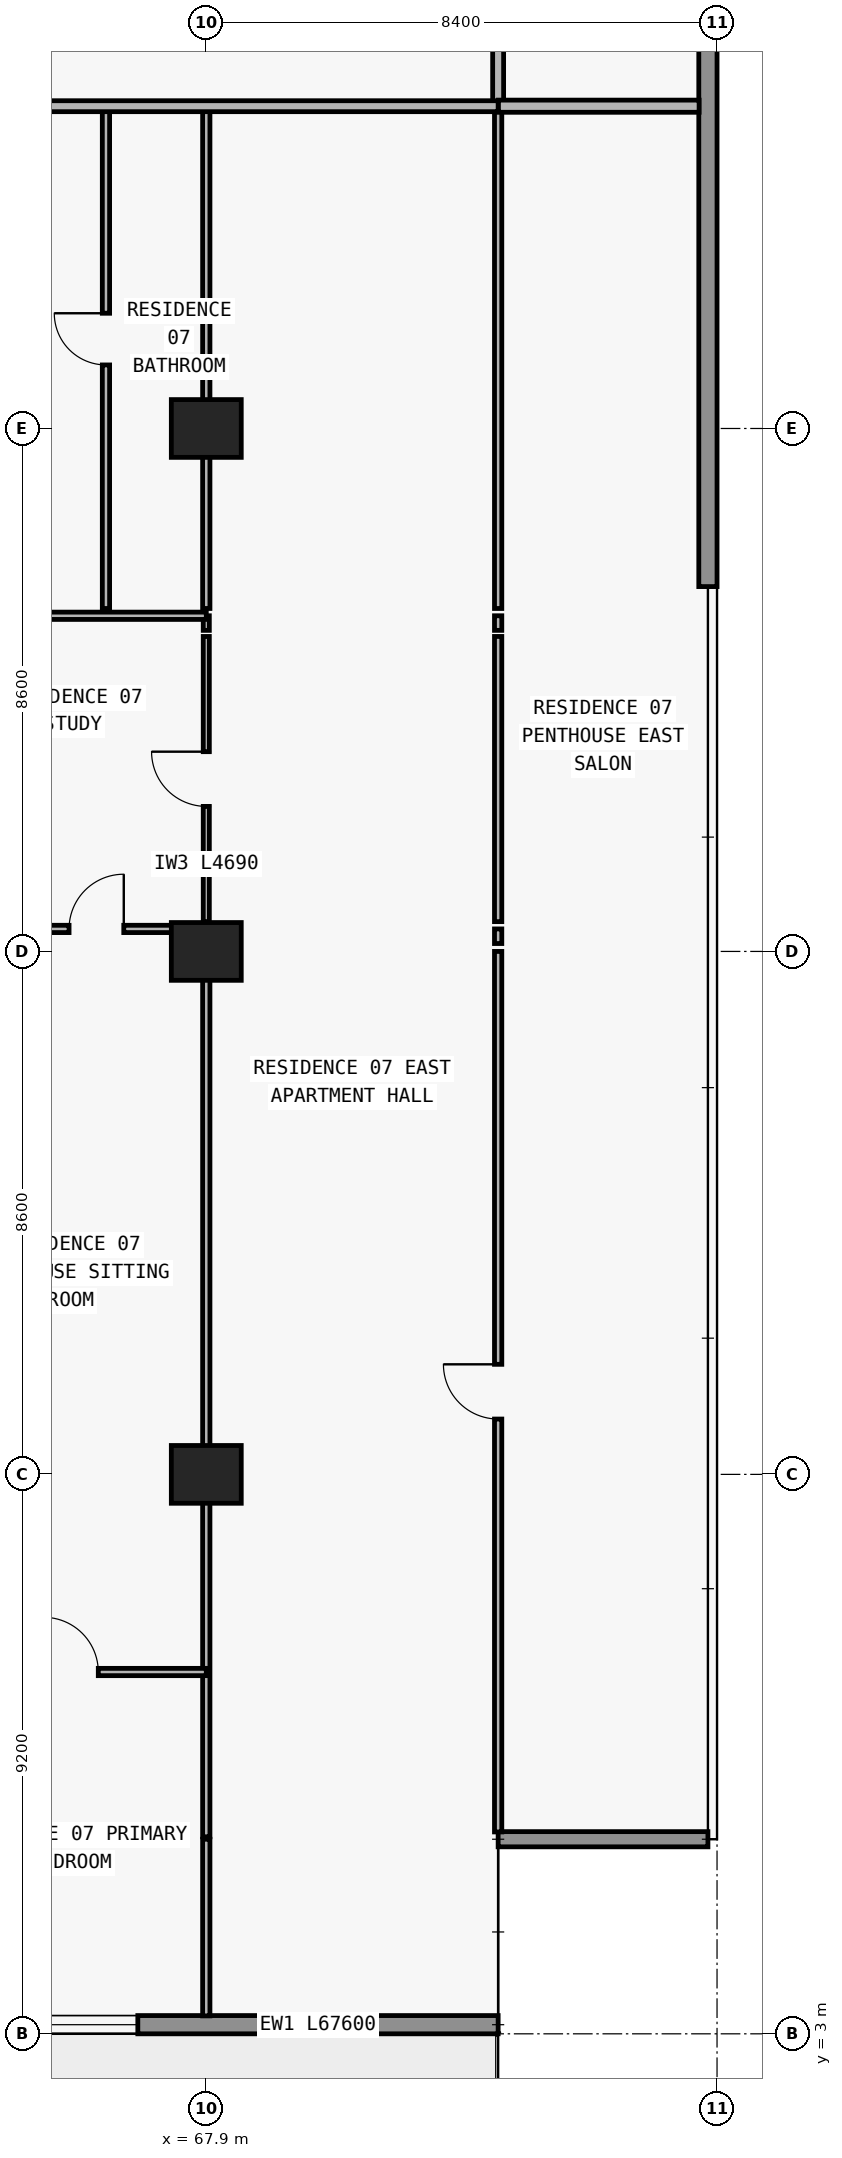
"""IFC4 building model, lengths in metres.
Left out: names, types, materials, properties, quantities, classifications, styles, units other than length and angle.
Written with IfcOpenShell. Run it as: python <this file> out.ifc"""

import sys

from ifc_helpers import new_model, si_unit, direction, frame, frame_2d, origin, origin_2d, place, context, subcontext, project, spatial, rectangle, extrude, element, fill, save


model = new_model("IFC4")
c1 = context("Model", 3, precision=1e-05, world=origin(), true_north=direction((0.0, 1.0)))
c2 = subcontext(c1, "Body", "Model", "MODEL_VIEW")
j1 = project(units=[si_unit("LENGTHUNIT", "METRE"), si_unit("PLANEANGLEUNIT", "RADIAN")], contexts=[c1])
p1 = place(None, origin())
s1 = spatial("IfcSite", under=j1, at=p1, CompositionType="ELEMENT")
p2 = place(p1, origin())
s2 = spatial("IfcBuilding", under=s1, at=p2, CompositionType="ELEMENT")
p3 = place(p2, frame((0.0, 0.0, 69.6)))
s3 = spatial("IfcBuildingStorey", under=s2, at=p3, CompositionType="ELEMENT", Elevation=69.6)
for number, where, z_axis, x_axis in (
    (1, (67.9, 12.2, 0.0), (0.0, 0.0, 1.0), (1.0, 0.0, 0.0)),
    (2, (67.9, 20.8, 0.0), (0.0, 0.0, 1.0), (1.0, 0.0, 0.0)),
    (3, (67.9, 29.4, 0.0), (0.0, 0.0, 1.0), (1.0, 0.0, 0.0)),
):
    element("IfcColumn", number, at=place(p3, frame(where, z_axis=z_axis, x_axis=x_axis)), inside=s3, PredefinedType="COLUMN", context=c2, shape_type="SweptSolid", body=[
        extrude(rectangle(XDim=1.15, YDim=0.95, at=origin_2d()), origin(), (0.0, 0.0, 1.0), 3.05),
    ])
p4 = place(p3, frame((72.7, 3.15, 0.0), z_axis=(0.0, 0.0, 1.0), x_axis=(-1.0, 0.0, 0.0)))
e4 = element("IfcWall", 4, at=p4, inside=s3, PredefinedType="STANDARD", context=c2, shape_type="SweptSolid", body=[
    extrude(rectangle(XDim=67.6, YDim=0.3, at=frame_2d((33.8, 0.0))), origin(), (0.0, 0.0, 1.0), 3.05),
])
p5 = place(p4, frame((59.826, 0.0, 0.0)))
e5 = element("IfcOpeningElement", 5, at=p5, cuts=e4, PredefinedType="OPENING", context=c2, shape_type="SweptSolid", body=[
    extrude(rectangle(XDim=2.0, YDim=2.3, at=frame_2d((1.0, 1.15))), frame((0.0, 0.16, 0.0), z_axis=(0.0, -1.0, 0.0), x_axis=(1.0, 0.0, 0.0)), (0.0, 0.0, 1.0), 0.32),
])
p6 = place(p4, frame((55.526, 0.0, 0.85)))
e6 = element("IfcOpeningElement", 6, at=p6, cuts=e4, PredefinedType="OPENING", context=c2, shape_type="SweptSolid", body=[
    extrude(rectangle(XDim=2.2, YDim=1.55, at=frame_2d((1.1, 0.775))), frame((0.0, 0.16, 0.0), z_axis=(0.0, -1.0, 0.0), x_axis=(1.0, 0.0, 0.0)), (0.0, 0.0, 1.0), 0.32),
])
p7 = place(p4, frame((51.09, 0.0, 0.0)))
e7 = element("IfcOpeningElement", 7, at=p7, cuts=e4, PredefinedType="OPENING", context=c2, shape_type="SweptSolid", body=[
    extrude(rectangle(XDim=2.0, YDim=2.3, at=frame_2d((1.0, 1.15))), frame((0.0, 0.16, 0.0), z_axis=(0.0, -1.0, 0.0), x_axis=(1.0, 0.0, 0.0)), (0.0, 0.0, 1.0), 0.32),
])
p8 = place(p4, frame((46.99, 0.0, 0.85)))
e8 = element("IfcOpeningElement", 8, at=p8, cuts=e4, PredefinedType="OPENING", context=c2, shape_type="SweptSolid", body=[
    extrude(rectangle(XDim=1.8, YDim=1.55, at=frame_2d((0.9, 0.775))), frame((0.0, 0.16, 0.0), z_axis=(0.0, -1.0, 0.0), x_axis=(1.0, 0.0, 0.0)), (0.0, 0.0, 1.0), 0.32),
])
p9 = place(p4, frame((43.026, 0.0, 0.0)))
e9 = element("IfcOpeningElement", 9, at=p9, cuts=e4, PredefinedType="OPENING", context=c2, shape_type="SweptSolid", body=[
    extrude(rectangle(XDim=2.0, YDim=2.3, at=frame_2d((1.0, 1.15))), frame((0.0, 0.16, 0.0), z_axis=(0.0, -1.0, 0.0), x_axis=(1.0, 0.0, 0.0)), (0.0, 0.0, 1.0), 0.32),
])
p10 = place(p4, frame((38.726, 0.0, 0.85)))
e10 = element("IfcOpeningElement", 10, at=p10, cuts=e4, PredefinedType="OPENING", context=c2, shape_type="SweptSolid", body=[
    extrude(rectangle(XDim=2.2, YDim=1.55, at=frame_2d((1.1, 0.775))), frame((0.0, 0.16, 0.0), z_axis=(0.0, -1.0, 0.0), x_axis=(1.0, 0.0, 0.0)), (0.0, 0.0, 1.0), 0.32),
])
p11 = place(p4, frame((34.51, 0.0, 0.0)))
e11 = element("IfcOpeningElement", 11, at=p11, cuts=e4, PredefinedType="OPENING", context=c2, shape_type="SweptSolid", body=[
    extrude(rectangle(XDim=2.0, YDim=2.3, at=frame_2d((1.0, 1.15))), frame((0.0, 0.16, 0.0), z_axis=(0.0, -1.0, 0.0), x_axis=(1.0, 0.0, 0.0)), (0.0, 0.0, 1.0), 0.32),
])
p12 = place(p4, frame((30.81, 0.0, 0.85)))
e12 = element("IfcOpeningElement", 12, at=p12, cuts=e4, PredefinedType="OPENING", context=c2, shape_type="SweptSolid", body=[
    extrude(rectangle(XDim=1.8, YDim=1.55, at=frame_2d((0.9, 0.775))), frame((0.0, 0.16, 0.0), z_axis=(0.0, -1.0, 0.0), x_axis=(1.0, 0.0, 0.0)), (0.0, 0.0, 1.0), 0.32),
])
p13 = place(p4, frame((27.026, 0.0, 0.0)))
e13 = element("IfcOpeningElement", 13, at=p13, cuts=e4, PredefinedType="OPENING", context=c2, shape_type="SweptSolid", body=[
    extrude(rectangle(XDim=2.0, YDim=2.3, at=frame_2d((1.0, 1.15))), frame((0.0, 0.16, 0.0), z_axis=(0.0, -1.0, 0.0), x_axis=(1.0, 0.0, 0.0)), (0.0, 0.0, 1.0), 0.32),
])
p14 = place(p4, frame((22.726, 0.0, 0.85)))
e14 = element("IfcOpeningElement", 14, at=p14, cuts=e4, PredefinedType="OPENING", context=c2, shape_type="SweptSolid", body=[
    extrude(rectangle(XDim=2.2, YDim=1.55, at=frame_2d((1.1, 0.775))), frame((0.0, 0.16, 0.0), z_axis=(0.0, -1.0, 0.0), x_axis=(1.0, 0.0, 0.0)), (0.0, 0.0, 1.0), 0.32),
])
p15 = place(p4, frame((18.29, 0.0, 0.0)))
e15 = element("IfcOpeningElement", 15, at=p15, cuts=e4, PredefinedType="OPENING", context=c2, shape_type="SweptSolid", body=[
    extrude(rectangle(XDim=2.0, YDim=2.3, at=frame_2d((1.0, 1.15))), frame((0.0, 0.16, 0.0), z_axis=(0.0, -1.0, 0.0), x_axis=(1.0, 0.0, 0.0)), (0.0, 0.0, 1.0), 0.32),
])
p16 = place(p4, frame((14.19, 0.0, 0.85)))
e16 = element("IfcOpeningElement", 16, at=p16, cuts=e4, PredefinedType="OPENING", context=c2, shape_type="SweptSolid", body=[
    extrude(rectangle(XDim=1.8, YDim=1.55, at=frame_2d((0.9, 0.775))), frame((0.0, 0.16, 0.0), z_axis=(0.0, -1.0, 0.0), x_axis=(1.0, 0.0, 0.0)), (0.0, 0.0, 1.0), 0.32),
])
p17 = place(p4, frame((10.226, 0.0, 0.0)))
e17 = element("IfcOpeningElement", 17, at=p17, cuts=e4, PredefinedType="OPENING", context=c2, shape_type="SweptSolid", body=[
    extrude(rectangle(XDim=2.0, YDim=2.3, at=frame_2d((1.0, 1.15))), frame((0.0, 0.16, 0.0), z_axis=(0.0, -1.0, 0.0), x_axis=(1.0, 0.0, 0.0)), (0.0, 0.0, 1.0), 0.32),
])
p18 = place(p4, frame((5.926, 0.0, 0.85)))
e18 = element("IfcOpeningElement", 18, at=p18, cuts=e4, PredefinedType="OPENING", context=c2, shape_type="SweptSolid", body=[
    extrude(rectangle(XDim=2.2, YDim=1.55, at=frame_2d((1.1, 0.775))), frame((0.0, 0.16, 0.0), z_axis=(0.0, -1.0, 0.0), x_axis=(1.0, 0.0, 0.0)), (0.0, 0.0, 1.0), 0.32),
])
p19 = place(p3, frame((72.7, 6.2, 0.0), z_axis=(0.0, 0.0, 1.0), x_axis=(1.0, 0.0, 0.0)))
e19 = element("IfcWall", 19, at=p19, inside=s3, PredefinedType="ELEMENTEDWALL", context=c2, shape_type="SweptSolid", body=[
    extrude(rectangle(XDim=3.45, YDim=0.25, at=frame_2d((1.725, 0.0))), origin(), (0.0, 0.0, 1.0), 3.05),
])
p20 = place(p3, frame((76.15, 47.4, 0.0), z_axis=(0.0, 0.0, 1.0), x_axis=(0.0, -1.0, 0.0)))
e20 = element("IfcWall", 20, at=p20, inside=s3, PredefinedType="STANDARD", context=c2, shape_type="SweptSolid", body=[
    extrude(rectangle(XDim=20.6, YDim=0.3, at=frame_2d((10.3, 0.0))), origin(), (0.0, 0.0, 1.0), 3.05),
])
p21 = place(p3, frame((66.25, 26.44, 0.0), z_axis=(0.0, 0.0, 1.0), x_axis=(0.0, 1.0, 0.0)))
e21 = element("IfcWall", 21, at=p21, inside=s3, PredefinedType="PARTITIONING", context=c2, shape_type="SweptSolid", body=[
    extrude(rectangle(XDim=8.26, YDim=0.12, at=frame_2d((4.13, 0.0))), origin(), (0.0, 0.0, 1.0), 3.05),
])
p22 = place(p21, frame((4.005, 0.0, 0.0)))
e22 = element("IfcOpeningElement", 22, at=p22, cuts=e21, PredefinedType="OPENING", context=c2, shape_type="SweptSolid", body=[
    extrude(rectangle(XDim=0.85, YDim=2.1, at=frame_2d((0.425, 1.05))), frame((0.0, 0.07, 0.0), z_axis=(0.0, -1.0, 0.0), x_axis=(1.0, 0.0, 0.0)), (0.0, 0.0, 1.0), 0.14),
])
p23 = place(p3, frame((67.9, 3.295, 0.0), z_axis=(0.0, 0.0, 1.0), x_axis=(0.0, 1.0, 0.0)))
e23 = element("IfcWall", 23, at=p23, inside=s3, PredefinedType="PARTITIONING", context=c2, shape_type="SweptSolid", body=[
    extrude(rectangle(XDim=2.905, YDim=0.12, at=frame_2d((1.453, 0.0))), origin(), (0.0, 0.0, 1.0), 3.05),
])
p24 = place(p3, frame((67.9, 6.24, 0.0), z_axis=(0.0, 0.0, 1.0), x_axis=(0.0, 1.0, 0.0)))
e24 = element("IfcWall", 24, at=p24, inside=s3, PredefinedType="PARTITIONING", context=c2, shape_type="SweptSolid", body=[
    extrude(rectangle(XDim=14.56, YDim=0.12, at=frame_2d((7.28, 0.0))), origin(), (0.0, 0.0, 1.0), 2.11),
])
p25 = place(p3, frame((67.9, 20.93, 0.0), z_axis=(0.0, 0.0, 1.0), x_axis=(0.0, 1.0, 0.0)))
e25 = element("IfcWall", 25, at=p25, inside=s3, PredefinedType="PARTITIONING", context=c2, shape_type="SweptSolid", body=[
    extrude(rectangle(XDim=0.24, YDim=0.12, at=frame_2d((0.12, 0.0))), origin(), (0.0, 0.0, 1.0), 3.05),
])
p26 = place(p3, frame((67.9, 21.29, 0.0), z_axis=(0.0, 0.0, 1.0), x_axis=(0.0, 1.0, 0.0)))
e26 = element("IfcWall", 26, at=p26, inside=s3, PredefinedType="MOVABLE", context=c2, shape_type="SweptSolid", body=[
    extrude(rectangle(XDim=4.69, YDim=0.1, at=frame_2d((2.345, 0.0))), origin(), (0.0, 0.0, 1.0), 2.11),
])
p27 = place(p26, frame((1.895, 0.0, 0.0)))
e27 = element("IfcOpeningElement", 27, at=p27, cuts=e26, PredefinedType="OPENING", context=c2, shape_type="SweptSolid", body=[
    extrude(rectangle(XDim=0.9, YDim=2.06, at=frame_2d((0.45, 1.03))), frame((0.0, 0.06, 0.0), z_axis=(0.0, -1.0, 0.0), x_axis=(1.0, 0.0, 0.0)), (0.0, 0.0, 1.0), 0.12),
])
p28 = place(p3, frame((67.9, 26.08, 0.0), z_axis=(0.0, 0.0, 1.0), x_axis=(0.0, 1.0, 0.0)))
e28 = element("IfcWall", 28, at=p28, inside=s3, PredefinedType="MOVABLE", context=c2, shape_type="SweptSolid", body=[
    extrude(rectangle(XDim=0.24, YDim=0.1, at=frame_2d((0.12, 0.0))), origin(), (0.0, 0.0, 1.0), 2.11),
])
p29 = place(p3, frame((67.9, 26.44, 0.0), z_axis=(0.0, 0.0, 1.0), x_axis=(0.0, 1.0, 0.0)))
e29 = element("IfcWall", 29, at=p29, inside=s3, PredefinedType="PARTITIONING", context=c2, shape_type="SweptSolid", body=[
    extrude(rectangle(XDim=8.26, YDim=0.12, at=frame_2d((4.13, 0.0))), origin(), (0.0, 0.0, 1.0), 2.11),
])
p30 = place(p3, frame((72.7, 6.32, 0.0), z_axis=(0.0, 0.0, 1.0), x_axis=(0.0, 1.0, 0.0)))
e30 = element("IfcWall", 30, at=p30, inside=s3, PredefinedType="PARTITIONING", context=c2, shape_type="SweptSolid", body=[
    extrude(rectangle(XDim=14.48, YDim=0.12, at=frame_2d((7.24, 0.0))), origin(), (0.0, 0.0, 1.0), 3.05),
])
p31 = place(p30, frame((6.79, 0.0, 0.0)))
e31 = element("IfcOpeningElement", 31, at=p31, cuts=e30, PredefinedType="OPENING", context=c2, shape_type="SweptSolid", body=[
    extrude(rectangle(XDim=0.9, YDim=2.15, at=frame_2d((0.45, 1.075))), frame((0.0, 0.07, 0.0), z_axis=(0.0, -1.0, 0.0), x_axis=(1.0, 0.0, 0.0)), (0.0, 0.0, 1.0), 0.14),
])
p32 = place(p3, frame((72.7, 20.93, 0.0), z_axis=(0.0, 0.0, 1.0), x_axis=(0.0, 1.0, 0.0)))
e32 = element("IfcWall", 32, at=p32, inside=s3, PredefinedType="PARTITIONING", context=c2, shape_type="SweptSolid", body=[
    extrude(rectangle(XDim=0.24, YDim=0.12, at=frame_2d((0.12, 0.0))), origin(), (0.0, 0.0, 1.0), 3.05),
])
p33 = place(p3, frame((72.7, 21.29, 0.0), z_axis=(0.0, 0.0, 1.0), x_axis=(0.0, 1.0, 0.0)))
e33 = element("IfcWall", 33, at=p33, inside=s3, PredefinedType="PARTITIONING", context=c2, shape_type="SweptSolid", body=[
    extrude(rectangle(XDim=4.69, YDim=0.12, at=frame_2d((2.345, 0.0))), origin(), (0.0, 0.0, 1.0), 3.05),
])
p34 = place(p3, frame((72.7, 26.08, 0.0), z_axis=(0.0, 0.0, 1.0), x_axis=(0.0, 1.0, 0.0)))
e34 = element("IfcWall", 34, at=p34, inside=s3, PredefinedType="PARTITIONING", context=c2, shape_type="SweptSolid", body=[
    extrude(rectangle(XDim=0.24, YDim=0.12, at=frame_2d((0.12, 0.0))), origin(), (0.0, 0.0, 1.0), 3.05),
])
p35 = place(p3, frame((72.7, 26.44, 0.0), z_axis=(0.0, 0.0, 1.0), x_axis=(0.0, 1.0, 0.0)))
e35 = element("IfcWall", 35, at=p35, inside=s3, PredefinedType="PARTITIONING", context=c2, shape_type="SweptSolid", body=[
    extrude(rectangle(XDim=8.26, YDim=0.12, at=frame_2d((4.13, 0.0))), origin(), (0.0, 0.0, 1.0), 3.05),
])
p36 = place(p3, frame((72.7, 34.705, 0.0), z_axis=(0.0, 0.0, 1.0), x_axis=(0.0, 1.0, 0.0)))
e36 = element("IfcWall", 36, at=p36, inside=s3, PredefinedType="PARTITIONING", context=c2, shape_type="SweptSolid", body=[
    extrude(rectangle(XDim=2.195, YDim=0.18, at=frame_2d((1.097, 0.0))), origin(), (0.0, 0.0, 1.0), 3.05),
])
p37 = place(p3, frame((63.448, 8.95, 0.0), z_axis=(0.0, 0.0, 1.0), x_axis=(1.0, 0.0, 0.0)))
e37 = element("IfcWall", 37, at=p37, inside=s3, PredefinedType="PARTITIONING", context=c2, shape_type="SweptSolid", body=[
    extrude(rectangle(XDim=4.452, YDim=0.12, at=frame_2d((2.226, 0.0))), origin(), (0.0, 0.0, 1.0), 3.05),
])
p38 = place(p37, frame((1.776, 0.0, 0.0)))
e38 = element("IfcOpeningElement", 38, at=p38, cuts=e37, PredefinedType="OPENING", context=c2, shape_type="SweptSolid", body=[
    extrude(rectangle(XDim=0.9, YDim=2.15, at=frame_2d((0.45, 1.075))), frame((0.0, 0.07, 0.0), z_axis=(0.0, -1.0, 0.0), x_axis=(1.0, 0.0, 0.0)), (0.0, 0.0, 1.0), 0.14),
])
p39 = place(p3, frame((59.5, 21.17, 0.0), z_axis=(0.0, 0.0, 1.0), x_axis=(1.0, 0.0, 0.0)))
e39 = element("IfcWall", 39, at=p39, inside=s3, PredefinedType="PARTITIONING", context=c2, shape_type="SweptSolid", body=[
    extrude(rectangle(XDim=8.4, YDim=0.12, at=frame_2d((4.2, 0.0))), origin(), (0.0, 0.0, 1.0), 3.05),
])
p40 = place(p39, frame((1.524, 0.0, 0.0)))
e40 = element("IfcOpeningElement", 40, at=p40, cuts=e39, PredefinedType="OPENING", context=c2, shape_type="SweptSolid", body=[
    extrude(rectangle(XDim=0.9, YDim=2.15, at=frame_2d((0.45, 1.075))), frame((0.0, 0.07, 0.0), z_axis=(0.0, -1.0, 0.0), x_axis=(1.0, 0.0, 0.0)), (0.0, 0.0, 1.0), 0.14),
])
p41 = place(p39, frame((6.143, 0.0, 0.0)))
e41 = element("IfcOpeningElement", 41, at=p41, cuts=e39, PredefinedType="OPENING", context=c2, shape_type="SweptSolid", body=[
    extrude(rectangle(XDim=0.9, YDim=2.15, at=frame_2d((0.45, 1.075))), frame((0.0, 0.07, 0.0), z_axis=(0.0, -1.0, 0.0), x_axis=(1.0, 0.0, 0.0)), (0.0, 0.0, 1.0), 0.14),
])
p42 = place(p3, frame((59.5, 26.32, 0.0), z_axis=(0.0, 0.0, 1.0), x_axis=(1.0, 0.0, 0.0)))
e42 = element("IfcWall", 42, at=p42, inside=s3, PredefinedType="PARTITIONING", context=c2, shape_type="SweptSolid", body=[
    extrude(rectangle(XDim=8.4, YDim=0.12, at=frame_2d((4.2, 0.0))), origin(), (0.0, 0.0, 1.0), 3.05),
])
p43 = place(p42, frame((1.943, 0.0, 0.0)))
e43 = element("IfcOpeningElement", 43, at=p43, cuts=e42, PredefinedType="OPENING", context=c2, shape_type="SweptSolid", body=[
    extrude(rectangle(XDim=0.9, YDim=2.15, at=frame_2d((0.45, 1.075))), frame((0.0, 0.07, 0.0), z_axis=(0.0, -1.0, 0.0), x_axis=(1.0, 0.0, 0.0)), (0.0, 0.0, 1.0), 0.14),
])
p44 = place(p3, frame((5.105, 34.7, 0.0), z_axis=(0.0, 0.0, 1.0), x_axis=(1.0, 0.0, 0.0)))
e44 = element("IfcWall", 44, at=p44, inside=s3, PredefinedType="PARTITIONING", context=c2, shape_type="SweptSolid", body=[
    extrude(rectangle(XDim=67.595, YDim=0.18, at=frame_2d((33.797, 0.0))), origin(), (0.0, 0.0, 1.0), 3.05),
])
p45 = place(p44, frame((7.67, 0.0, 0.0)))
e45 = element("IfcOpeningElement", 45, at=p45, cuts=e44, PredefinedType="OPENING", context=c2, shape_type="SweptSolid", body=[
    extrude(rectangle(XDim=1.0, YDim=2.2, at=frame_2d((0.5, 1.1))), frame((0.0, 0.1, 0.0), z_axis=(0.0, -1.0, 0.0), x_axis=(1.0, 0.0, 0.0)), (0.0, 0.0, 1.0), 0.2),
])
p46 = place(p44, frame((16.07, 0.0, 0.0)))
e46 = element("IfcOpeningElement", 46, at=p46, cuts=e44, PredefinedType="OPENING", context=c2, shape_type="SweptSolid", body=[
    extrude(rectangle(XDim=1.0, YDim=2.2, at=frame_2d((0.5, 1.1))), frame((0.0, 0.1, 0.0), z_axis=(0.0, -1.0, 0.0), x_axis=(1.0, 0.0, 0.0)), (0.0, 0.0, 1.0), 0.2),
])
p47 = place(p44, frame((24.47, 0.0, 0.0)))
e47 = element("IfcOpeningElement", 47, at=p47, cuts=e44, PredefinedType="OPENING", context=c2, shape_type="SweptSolid", body=[
    extrude(rectangle(XDim=1.0, YDim=2.2, at=frame_2d((0.5, 1.1))), frame((0.0, 0.1, 0.0), z_axis=(0.0, -1.0, 0.0), x_axis=(1.0, 0.0, 0.0)), (0.0, 0.0, 1.0), 0.2),
])
p48 = place(p44, frame((32.47, 0.0, 0.0)))
e48 = element("IfcOpeningElement", 48, at=p48, cuts=e44, PredefinedType="OPENING", context=c2, shape_type="SweptSolid", body=[
    extrude(rectangle(XDim=1.0, YDim=2.2, at=frame_2d((0.5, 1.1))), frame((0.0, 0.1, 0.0), z_axis=(0.0, -1.0, 0.0), x_axis=(1.0, 0.0, 0.0)), (0.0, 0.0, 1.0), 0.2),
])
p49 = place(p44, frame((40.47, 0.0, 0.0)))
e49 = element("IfcOpeningElement", 49, at=p49, cuts=e44, PredefinedType="OPENING", context=c2, shape_type="SweptSolid", body=[
    extrude(rectangle(XDim=1.0, YDim=2.2, at=frame_2d((0.5, 1.1))), frame((0.0, 0.1, 0.0), z_axis=(0.0, -1.0, 0.0), x_axis=(1.0, 0.0, 0.0)), (0.0, 0.0, 1.0), 0.2),
])
p50 = place(p44, frame((48.87, 0.0, 0.0)))
e50 = element("IfcOpeningElement", 50, at=p50, cuts=e44, PredefinedType="OPENING", context=c2, shape_type="SweptSolid", body=[
    extrude(rectangle(XDim=1.0, YDim=2.2, at=frame_2d((0.5, 1.1))), frame((0.0, 0.1, 0.0), z_axis=(0.0, -1.0, 0.0), x_axis=(1.0, 0.0, 0.0)), (0.0, 0.0, 1.0), 0.2),
])
p51 = place(p44, frame((57.27, 0.0, 0.0)))
e51 = element("IfcOpeningElement", 51, at=p51, cuts=e44, PredefinedType="OPENING", context=c2, shape_type="SweptSolid", body=[
    extrude(rectangle(XDim=1.0, YDim=2.2, at=frame_2d((0.5, 1.1))), frame((0.0, 0.1, 0.0), z_axis=(0.0, -1.0, 0.0), x_axis=(1.0, 0.0, 0.0)), (0.0, 0.0, 1.0), 0.2),
])
p52 = place(p3, frame((72.705, 34.7, 0.0), z_axis=(0.0, 0.0, 1.0), x_axis=(1.0, 0.0, 0.0)))
e52 = element("IfcWall", 52, at=p52, inside=s3, PredefinedType="PARTITIONING", context=c2, shape_type="SweptSolid", body=[
    extrude(rectangle(XDim=3.3, YDim=0.2, at=frame_2d((1.65, 0.0))), origin(), (0.0, 0.0, 1.0), 3.05),
])
p53 = place(p18, origin())
e53 = element("IfcWindow", 53, at=p53, inside=s3, PartitioningType="SINGLE_PANEL", PredefinedType="WINDOW", context=c2, shape_type="SweptSolid", body=[
    extrude(rectangle(XDim=2.2, YDim=1.55, at=frame_2d((1.1, 0.775))), frame((0.0, 0.03, 0.0), z_axis=(0.0, -1.0, 0.0), x_axis=(1.0, 0.0, 0.0)), (0.0, 0.0, 1.0), 0.06),
])
fill(e18, e53)
p54 = place(p22, origin())
e54 = element("IfcDoor", 54, at=p54, inside=s3, OperationType="SINGLE_SWING_RIGHT", PredefinedType="DOOR", context=c2, shape_type="SweptSolid", body=[
    extrude(rectangle(XDim=0.85, YDim=2.1, at=frame_2d((0.425, 1.05))), frame((0.0, 0.025, 0.0), z_axis=(0.0, -1.0, 0.0), x_axis=(1.0, 0.0, 0.0)), (0.0, 0.0, 1.0), 0.05),
])
fill(e22, e54)
p55 = place(p41, origin())
e55 = element("IfcDoor", 55, at=p55, inside=s3, OperationType="SINGLE_SWING_RIGHT", PredefinedType="DOOR", context=c2, shape_type="SweptSolid", body=[
    extrude(rectangle(XDim=0.9, YDim=2.15, at=frame_2d((0.45, 1.075))), frame((0.0, 0.025, 0.0), z_axis=(0.0, -1.0, 0.0), x_axis=(1.0, 0.0, 0.0)), (0.0, 0.0, 1.0), 0.05),
])
fill(e41, e55)
p56 = place(p38, origin())
e56 = element("IfcDoor", 56, at=p56, inside=s3, OperationType="SINGLE_SWING_LEFT", PredefinedType="DOOR", context=c2, shape_type="SweptSolid", body=[
    extrude(rectangle(XDim=0.9, YDim=2.15, at=frame_2d((0.45, 1.075))), frame((0.0, 0.025, 0.0), z_axis=(0.0, -1.0, 0.0), x_axis=(1.0, 0.0, 0.0)), (0.0, 0.0, 1.0), 0.05),
])
fill(e38, e56)
p57 = place(p27, origin())
e57 = element("IfcDoor", 57, at=p57, inside=s3, OperationType="SINGLE_SWING_RIGHT", PredefinedType="DOOR", context=c2, shape_type="SweptSolid", body=[
    extrude(rectangle(XDim=0.9, YDim=2.06, at=frame_2d((0.45, 1.03))), frame((0.0, 0.025, 0.0), z_axis=(0.0, -1.0, 0.0), x_axis=(1.0, 0.0, 0.0)), (0.0, 0.0, 1.0), 0.05),
])
fill(e27, e57)
p58 = place(p31, origin())
e58 = element("IfcDoor", 58, at=p58, inside=s3, OperationType="SINGLE_SWING_RIGHT", PredefinedType="DOOR", context=c2, shape_type="SweptSolid", body=[
    extrude(rectangle(XDim=0.9, YDim=2.15, at=frame_2d((0.45, 1.075))), frame((0.0, 0.025, 0.0), z_axis=(0.0, -1.0, 0.0), x_axis=(1.0, 0.0, 0.0)), (0.0, 0.0, 1.0), 0.05),
])
fill(e31, e58)
save(model, sys.argv[1])
